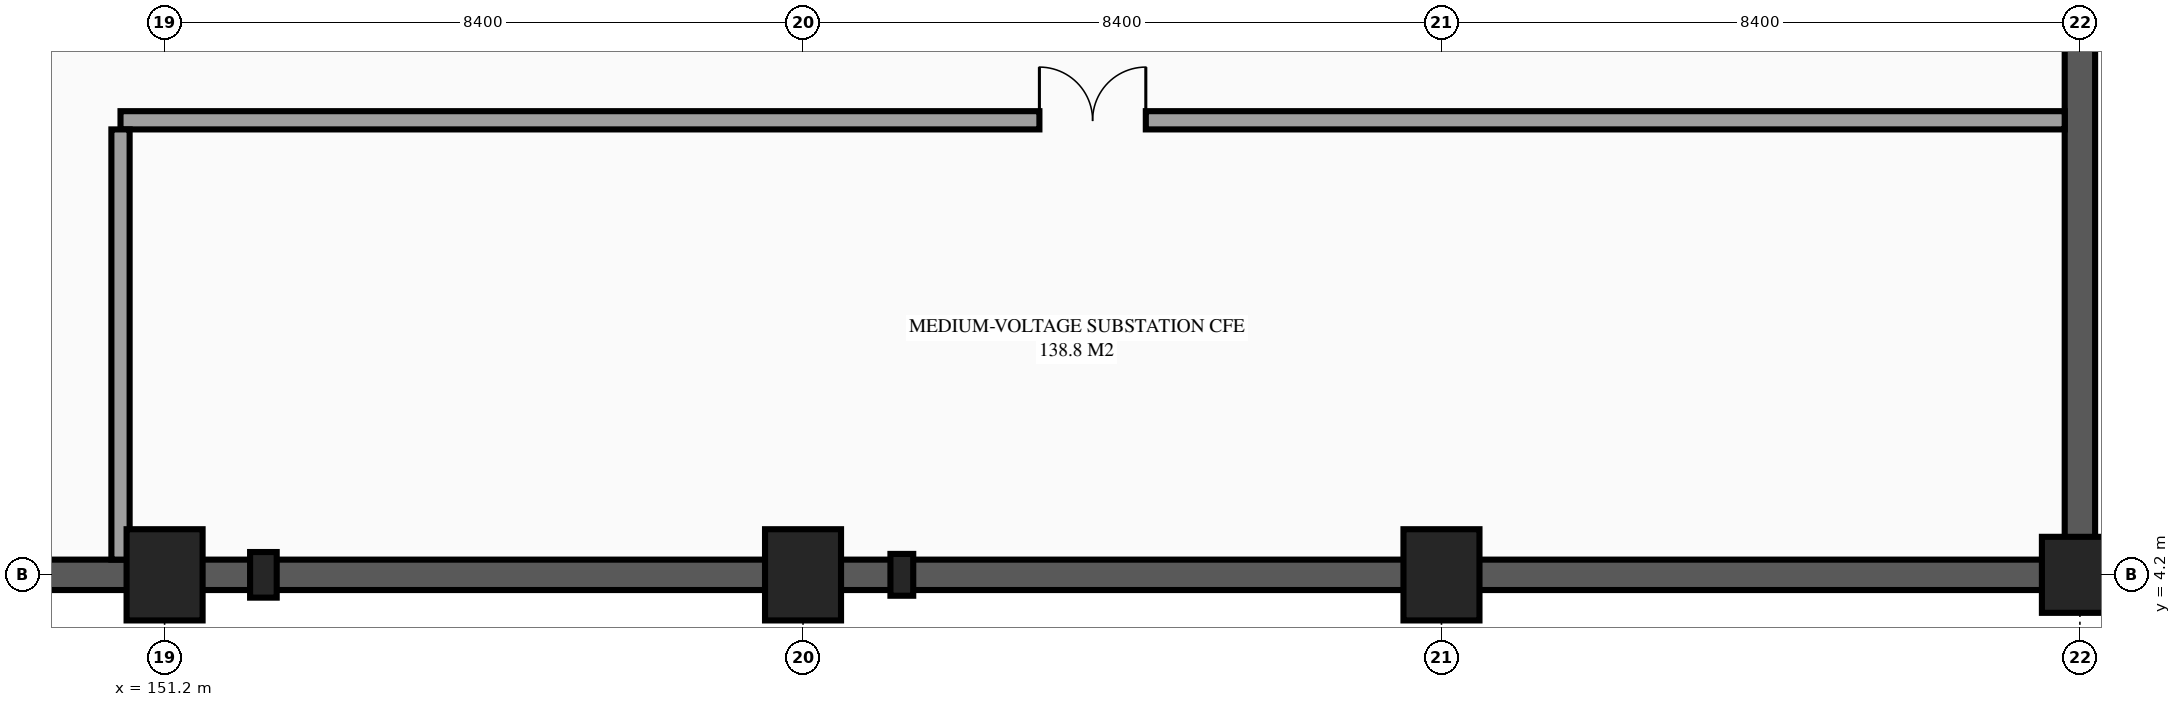
"""IFC4 building model, lengths in metres.
Left out: names, types, materials, properties, quantities, classifications, styles, units other than length and angle.
Written with IfcOpenShell. Run it as: python <this file> out.ifc"""

import sys

from ifc_helpers import new_model, si_unit, direction, frame, frame_2d, origin, origin_2d, place, context, subcontext, project, spatial, rectangle, extrude, element, fill, save


model = new_model("IFC4")
c1 = context("Model", 3, precision=1e-05, world=origin(), true_north=direction((0.0, 1.0)))
c2 = subcontext(c1, "Body", "Model", "MODEL_VIEW")
j1 = project(units=[si_unit("LENGTHUNIT", "METRE"), si_unit("PLANEANGLEUNIT", "RADIAN")], contexts=[c1])
p1 = place(None, origin())
s1 = spatial("IfcSite", under=j1, at=p1, CompositionType="ELEMENT")
p2 = place(p1, origin())
s2 = spatial("IfcBuilding", under=s1, at=p2, CompositionType="ELEMENT")
p3 = place(p2, frame((0.0, 0.0, -4.5)))
s3 = spatial("IfcBuildingStorey", under=s2, at=p3, CompositionType="ELEMENT", Elevation=-4.5)
for number, where, z_axis, x_axis in (
    (1, (151.2, 4.2, -0.36), (0.0, 0.0, 1.0), (1.0, 0.0, 0.0)),
    (2, (159.6, 4.2, -0.36), (0.0, 0.0, 1.0), (1.0, 0.0, 0.0)),
    (3, (168.0, 4.2, -0.36), (0.0, 0.0, 1.0), (1.0, 0.0, 0.0)),
):
    element("IfcColumn", number, at=place(p3, frame(where, z_axis=z_axis, x_axis=x_axis)), inside=s3, PredefinedType="COLUMN", context=c2, shape_type="SweptSolid", body=[
        extrude(rectangle(XDim=1.0, YDim=1.2, at=origin_2d()), origin(), (0.0, 0.0, 1.0), 4.86),
    ])
p4 = place(p3, frame((176.4, 4.2, -0.36), z_axis=(0.0, 0.0, 1.0), x_axis=(1.0, 0.0, 0.0)))
e4 = element("IfcColumn", 4, at=p4, inside=s3, PredefinedType="COLUMN", context=c2, shape_type="SweptSolid", body=[
    extrude(rectangle(XDim=1.0, YDim=1.0, at=origin_2d()), origin(), (0.0, 0.0, 1.0), 4.86),
])
p5 = place(p3, frame((152.5, 4.2, -0.36), z_axis=(0.0, 0.0, 1.0), x_axis=(1.0, 0.0, 0.0)))
e5 = element("IfcColumn", 5, at=p5, inside=s3, PredefinedType="PILASTER", context=c2, shape_type="SweptSolid", body=[
    extrude(rectangle(XDim=0.35, YDim=0.6, at=origin_2d()), origin(), (0.0, 0.0, 1.0), 4.86),
])
p6 = place(p3, frame((160.9, 4.2, -0.36), z_axis=(0.0, 0.0, 1.0), x_axis=(1.0, 0.0, 0.0)))
e6 = element("IfcColumn", 6, at=p6, inside=s3, PredefinedType="PILASTER", context=c2, shape_type="SweptSolid", body=[
    extrude(rectangle(XDim=0.3, YDim=0.55, at=origin_2d()), origin(), (0.0, 0.0, 1.0), 4.86),
])
p7 = place(p3, frame((16.8, 4.2, -0.36), z_axis=(0.0, 0.0, 1.0), x_axis=(1.0, 0.0, 0.0)))
e7 = element("IfcWall", 7, at=p7, inside=s3, PredefinedType="STANDARD", context=c2, shape_type="SweptSolid", body=[
    extrude(rectangle(XDim=159.6, YDim=0.4, at=frame_2d((79.8, 0.0))), origin(), (0.0, 0.0, 1.0), 4.86),
])
p8 = place(p3, frame((176.4, 4.2, -0.36), z_axis=(0.0, 0.0, 1.0), x_axis=(0.0, 1.0, 0.0)))
e8 = element("IfcWall", 8, at=p8, inside=s3, PredefinedType="STANDARD", context=c2, shape_type="SweptSolid", body=[
    extrude(rectangle(XDim=75.6, YDim=0.4, at=frame_2d((37.8, 0.0))), origin(), (0.0, 0.0, 1.0), 4.86),
])
p9 = place(p3, frame((150.62, 10.18, 0.0), z_axis=(0.0, 0.0, 1.0), x_axis=(1.0, 0.0, 0.0)))
e9 = element("IfcWall", 9, at=p9, inside=s3, PredefinedType="PARTITIONING", context=c2, shape_type="SweptSolid", body=[
    extrude(rectangle(XDim=25.58, YDim=0.24, at=frame_2d((12.79, 0.0))), origin(), (0.0, 0.0, 1.0), 4.175),
])
p10 = place(p9, frame((12.09, 0.0, 0.0)))
e10 = element("IfcOpeningElement", 10, at=p10, cuts=e9, PredefinedType="OPENING", context=c2, shape_type="SweptSolid", body=[
    extrude(rectangle(XDim=1.4, YDim=2.2, at=frame_2d((0.7, 1.1))), frame((0.0, 0.13, 0.0), z_axis=(0.0, -1.0, 0.0), x_axis=(1.0, 0.0, 0.0)), (0.0, 0.0, 1.0), 0.26),
])
p11 = place(p3, frame((150.62, 4.4, 0.0), z_axis=(0.0, 0.0, 1.0), x_axis=(0.0, 1.0, 0.0)))
e11 = element("IfcWall", 11, at=p11, inside=s3, PredefinedType="PARTITIONING", context=c2, shape_type="SweptSolid", body=[
    extrude(rectangle(XDim=5.66, YDim=0.24, at=frame_2d((2.83, 0.0))), origin(), (0.0, 0.0, 1.0), 4.175),
])
p12 = place(p10, origin())
e12 = element("IfcDoor", 12, at=p12, inside=s3, OperationType="DOUBLE_DOOR_SINGLE_SWING", PredefinedType="DOOR", context=c2, shape_type="SweptSolid", body=[
    extrude(rectangle(XDim=1.4, YDim=2.2, at=frame_2d((0.7, 1.1))), frame((0.0, 0.025, 0.0), z_axis=(0.0, -1.0, 0.0), x_axis=(1.0, 0.0, 0.0)), (0.0, 0.0, 1.0), 0.05),
])
fill(e10, e12)
save(model, sys.argv[1])
